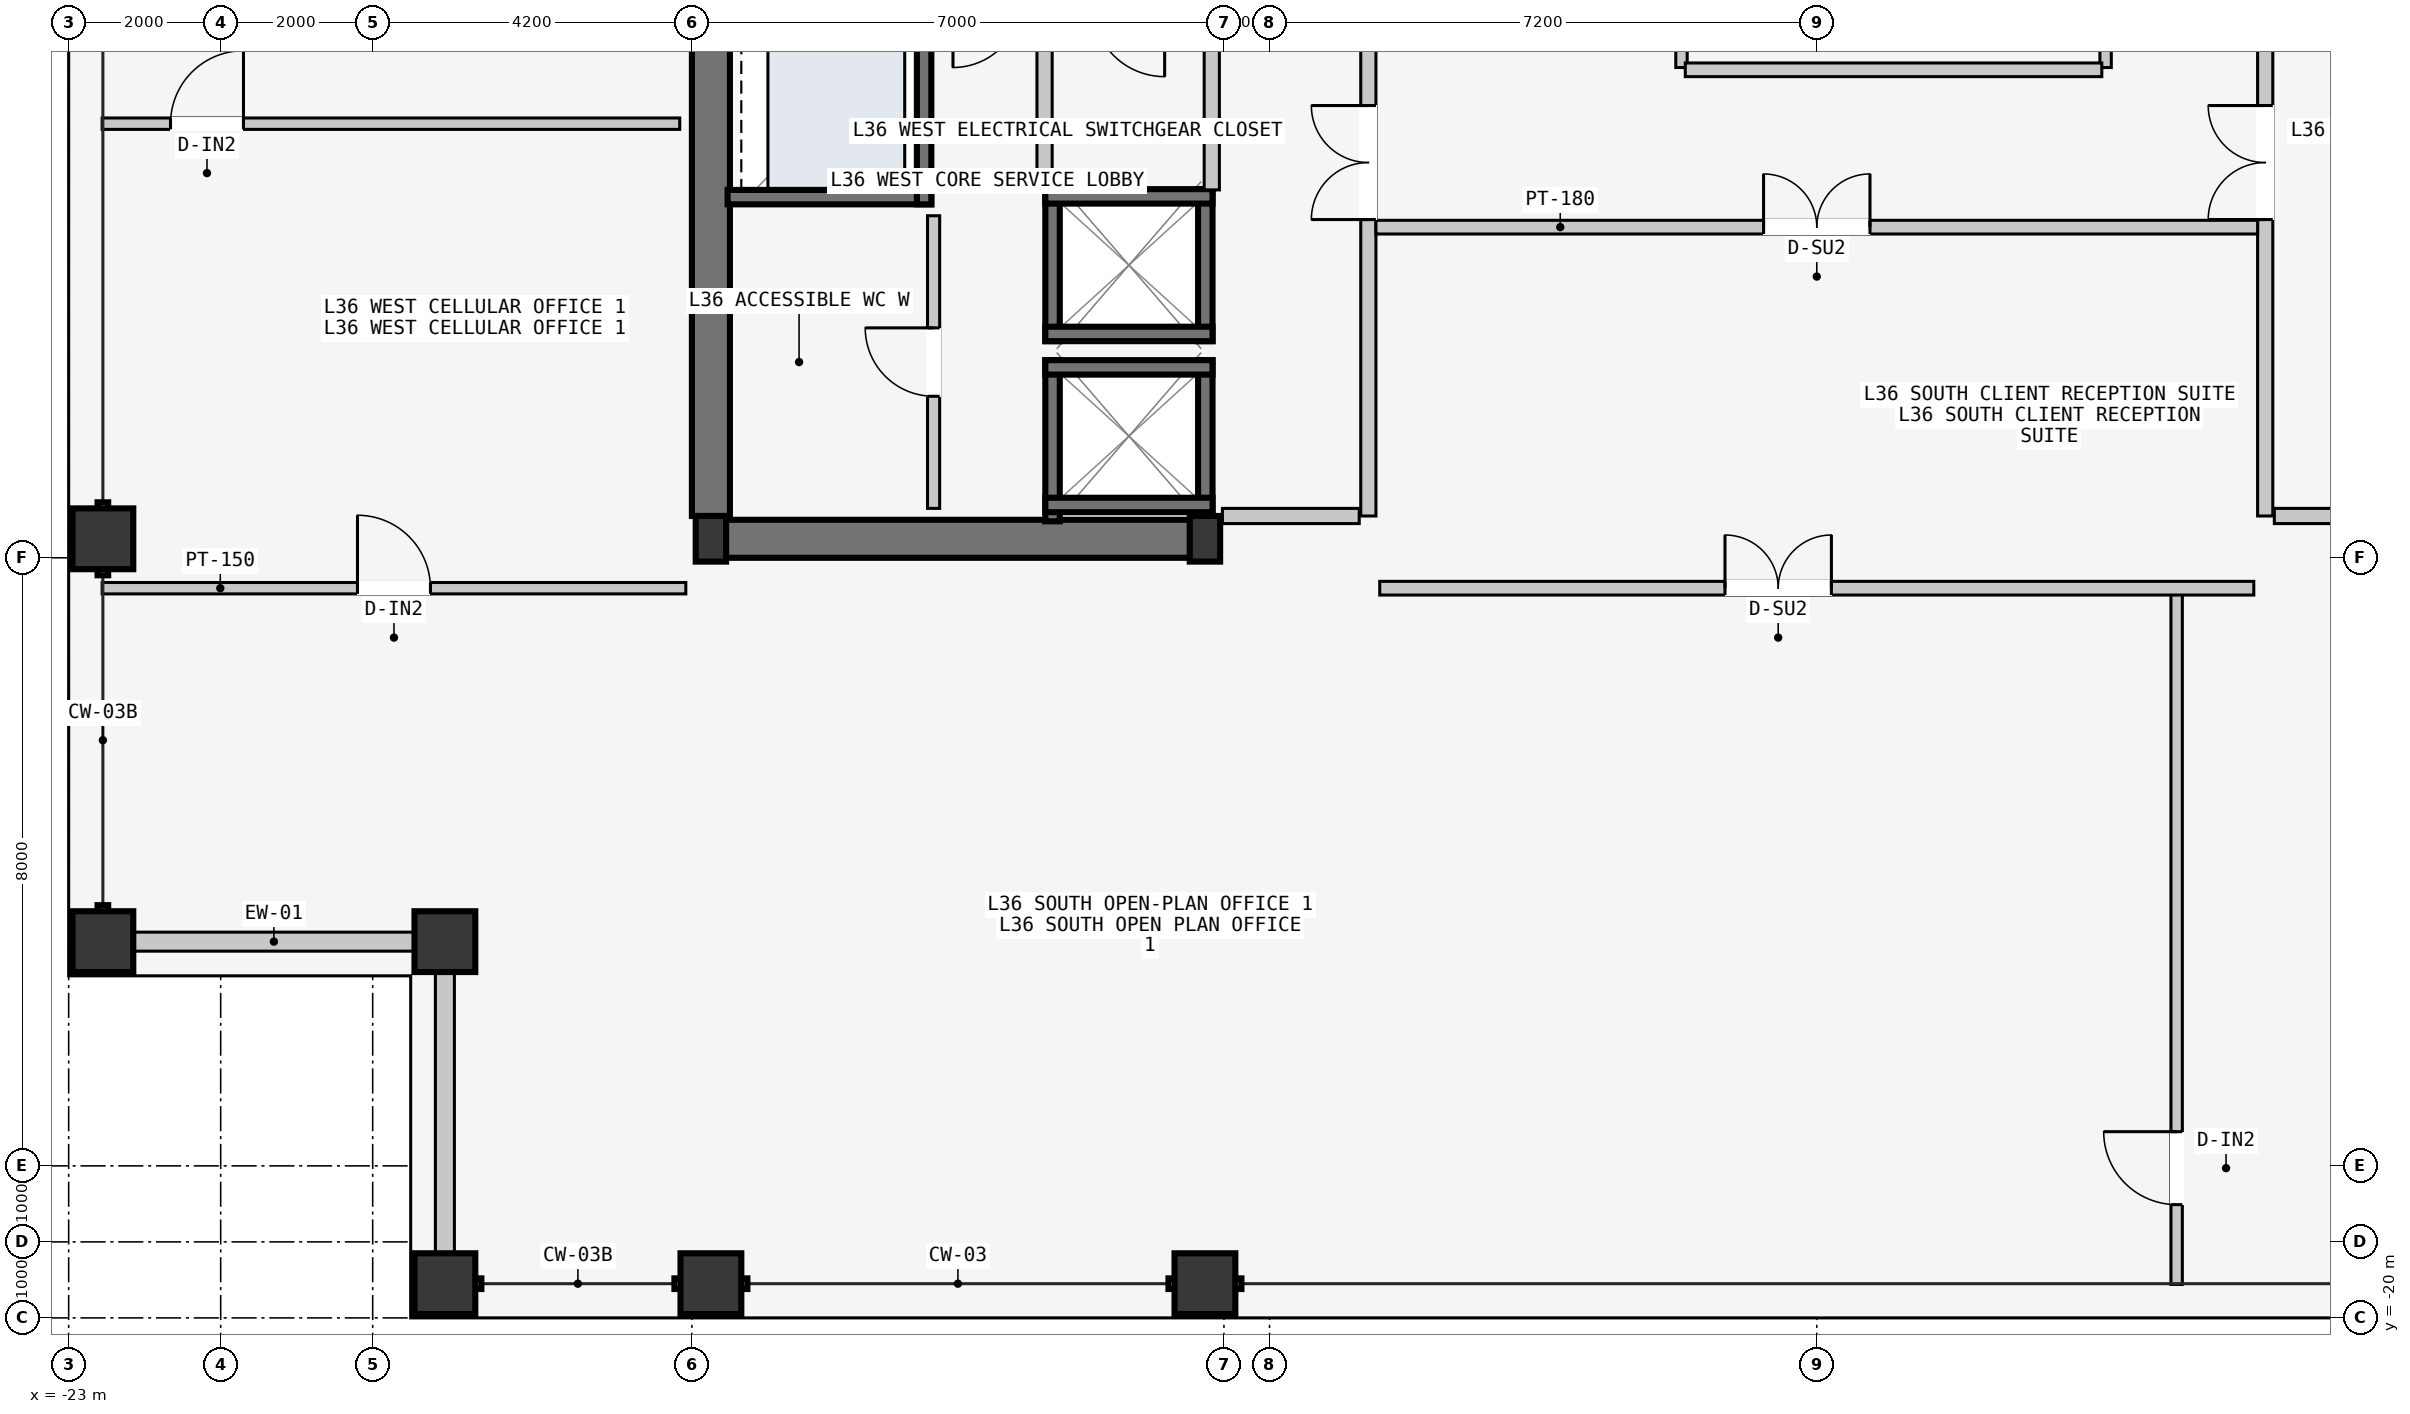
"""IFC4 building model, lengths in metres.
Left out: names, types, materials, properties, quantities, classifications, styles, units other than length and angle.
Written with IfcOpenShell. Run it as: python <this file> out.ifc"""

import sys

from ifc_helpers import new_model, si_unit, direction, frame, frame_2d, origin, origin_2d, place, context, subcontext, project, spatial, rectangle, hollow_rectangle, i_section, extrude, element, fill, save


model = new_model("IFC4")
c1 = context("Model", 3, precision=1e-05, world=origin(), true_north=direction((0.0, 1.0)))
c2 = subcontext(c1, "Body", "Model", "MODEL_VIEW")
j1 = project(units=[si_unit("LENGTHUNIT", "METRE"), si_unit("PLANEANGLEUNIT", "RADIAN")], contexts=[c1])
p1 = place(None, origin())
s1 = spatial("IfcSite", under=j1, at=p1, CompositionType="ELEMENT")
p2 = place(p1, origin())
s2 = spatial("IfcBuilding", under=s1, at=p2, CompositionType="ELEMENT")
p3 = place(p2, frame((0.0, 0.0, 138.6)))
s3 = spatial("IfcBuildingStorey", under=s2, at=p3, CompositionType="ELEMENT", Elevation=138.6)
p4 = place(p3, frame((-14.53, -9.75, -0.2), z_axis=(0.0, 0.0, 1.0), x_axis=(1.0, 0.0, 0.0)))
e1 = element("IfcWall", 1, at=p4, inside=s3, PredefinedType="SHEAR", context=c2, shape_type="SweptSolid", body=[
    extrude(rectangle(XDim=6.46, YDim=0.5, at=frame_2d((3.23, 0.0))), origin(), (0.0, 0.0, 1.0), 3.6),
])
p5 = place(p3, frame((-14.55, -9.45, -0.2), z_axis=(0.0, 0.0, 1.0), x_axis=(0.0, 1.0, 0.0)))
e2 = element("IfcWall", 2, at=p5, inside=s3, PredefinedType="SHEAR", context=c2, shape_type="SweptSolid", body=[
    extrude(rectangle(XDim=9.15, YDim=0.5, at=frame_2d((4.575, 0.0))), origin(), (0.0, 0.0, 1.0), 3.6),
])
for number, where, z_axis, x_axis in (
    (3, (-14.55, -9.75, 0.0), (0.0, 0.0, 1.0), (1.0, 0.0, 0.0)),
    (4, (-8.05, -9.75, 0.0), (0.0, 0.0, 1.0), (1.0, 0.0, 0.0)),
):
    element("IfcColumn", number, at=place(p3, frame(where, z_axis=z_axis, x_axis=x_axis)), inside=s3, PredefinedType="COLUMN", context=c2, shape_type="SweptSolid", body=[
        extrude(i_section(OverallWidth=0.4, OverallDepth=0.6, WebThickness=0.022, FlangeThickness=0.036, at=origin_2d()), origin(), (0.0, 0.0, 1.0), 3.6),
    ])
for number, where, z_axis, x_axis in (
    (5, (-18.05, -19.55, 0.0), (0.0, 0.0, 1.0), (1.0, 0.0, 0.0)),
    (6, (-14.55, -19.55, 0.0), (0.0, 0.0, 1.0), (1.0, 0.0, 0.0)),
    (7, (-8.05, -19.55, 0.0), (0.0, 0.0, 1.0), (1.0, 0.0, 0.0)),
    (8, (-22.55, -15.05, 0.0), (0.0, 0.0, 1.0), (0.0, 1.0, 0.0)),
    (9, (-22.55, -9.75, 0.0), (0.0, 0.0, 1.0), (0.0, 1.0, 0.0)),
    (10, (-18.05, -15.05, 0.0), (0.0, 0.0, 1.0), (1.0, 0.0, 0.0)),
):
    element("IfcColumn", number, at=place(p3, frame(where, z_axis=z_axis, x_axis=x_axis)), inside=s3, PredefinedType="COLUMN", context=c2, shape_type="SweptSolid", body=[
        extrude(hollow_rectangle(XDim=0.8, YDim=0.8, WallThickness=0.036, at=origin_2d()), origin(), (0.0, 0.0, 1.0), 3.6),
    ])
for number, where, z_axis, x_axis in (
    (11, (-22.14, -15.05, 0.0), (0.0, 0.0, 1.0), (1.0, 0.0, 0.0)),
    (12, (-18.05, -19.14, 0.0), (0.0, 0.0, 1.0), (0.0, 1.0, 0.0)),
):
    element("IfcWall", number, at=place(p3, frame(where, z_axis=z_axis, x_axis=x_axis)), inside=s3, PredefinedType="STANDARD", context=c2, shape_type="SweptSolid", body=[
        extrude(rectangle(XDim=3.68, YDim=0.25, at=frame_2d((1.84, 0.0))), origin(), (0.0, 0.0, 1.0), 2.75),
    ])
for number, where, z_axis, x_axis in (
    (13, (-8.045, -9.52, -0.2), (0.0, 0.0, 1.0), (0.0, 1.0, 0.0)),
    (14, (-10.055, -9.52, -0.2), (0.0, 0.0, 1.0), (0.0, 1.0, 0.0)),
):
    element("IfcWall", number, at=place(p3, frame(where, z_axis=z_axis, x_axis=x_axis)), inside=s3, PredefinedType="SOLIDWALL", context=c2, shape_type="SweptSolid", body=[
        extrude(rectangle(XDim=2.12, YDim=0.19, at=frame_2d((1.06, 0.0))), origin(), (0.0, 0.0, 1.0), 3.6),
    ])
for number, where, z_axis, x_axis in (
    (15, (-10.15, -7.495, -0.2), (0.0, 0.0, 1.0), (1.0, 0.0, 0.0)),
    (16, (-10.15, -9.305, -0.2), (0.0, 0.0, 1.0), (1.0, 0.0, 0.0)),
):
    element("IfcWall", number, at=place(p3, frame(where, z_axis=z_axis, x_axis=x_axis)), inside=s3, PredefinedType="SOLIDWALL", context=c2, shape_type="SweptSolid", body=[
        extrude(rectangle(XDim=2.2, YDim=0.19, at=frame_2d((1.1, 0.0))), origin(), (0.0, 0.0, 1.0), 3.6),
    ])
for number, where, z_axis, x_axis in (
    (17, (-8.045, -7.15, -0.2), (0.0, 0.0, 1.0), (0.0, 1.0, 0.0)),
    (18, (-10.055, -7.15, -0.2), (0.0, 0.0, 1.0), (0.0, 1.0, 0.0)),
):
    element("IfcWall", number, at=place(p3, frame(where, z_axis=z_axis, x_axis=x_axis)), inside=s3, PredefinedType="SOLIDWALL", context=c2, shape_type="SweptSolid", body=[
        extrude(rectangle(XDim=2.0, YDim=0.19, at=frame_2d((1.0, 0.0))), origin(), (0.0, 0.0, 1.0), 3.6),
    ])
for number, where, z_axis, x_axis in (
    (19, (-10.15, -5.245, -0.2), (0.0, 0.0, 1.0), (1.0, 0.0, 0.0)),
    (20, (-10.15, -7.055, -0.2), (0.0, 0.0, 1.0), (1.0, 0.0, 0.0)),
):
    element("IfcWall", number, at=place(p3, frame(where, z_axis=z_axis, x_axis=x_axis)), inside=s3, PredefinedType="SOLIDWALL", context=c2, shape_type="SweptSolid", body=[
        extrude(rectangle(XDim=2.2, YDim=0.19, at=frame_2d((1.1, 0.0))), origin(), (0.0, 0.0, 1.0), 3.6),
    ])
p6 = place(p3, frame((-14.33, -5.255, -0.2), z_axis=(0.0, 0.0, 1.0), x_axis=(1.0, 0.0, 0.0)))
e21 = element("IfcWall", 21, at=p6, inside=s3, PredefinedType="SOLIDWALL", context=c2, shape_type="SweptSolid", body=[
    extrude(rectangle(XDim=2.68, YDim=0.19, at=frame_2d((1.34, 0.0))), origin(), (0.0, 0.0, 1.0), 3.6),
])
p7 = place(p3, frame((-11.745, -5.35, -0.2), z_axis=(0.0, 0.0, 1.0), x_axis=(0.0, 1.0, 0.0)))
e22 = element("IfcWall", 22, at=p7, inside=s3, PredefinedType="SOLIDWALL", context=c2, shape_type="SweptSolid", body=[
    extrude(rectangle(XDim=2.6, YDim=0.19, at=frame_2d((1.3, 0.0))), origin(), (0.0, 0.0, 1.0), 3.6),
])
p8 = place(p3, frame((-5.9, -9.45, 0.0), z_axis=(0.0, 0.0, 1.0), x_axis=(0.0, 1.0, 0.0)))
e23 = element("IfcWall", 23, at=p8, inside=s3, PredefinedType="PARTITIONING", context=c2, shape_type="SweptSolid", body=[
    extrude(rectangle(XDim=10.5, YDim=0.2, at=frame_2d((5.25, 0.0))), origin(), (0.0, 0.0, 1.0), 3.4),
])
p9 = place(p8, frame((3.9, 0.0, 0.0)))
e24 = element("IfcOpeningElement", 24, at=p9, cuts=e23, PredefinedType="OPENING", context=c2, shape_type="SweptSolid", body=[
    extrude(rectangle(XDim=1.5, YDim=2.2, at=frame_2d((0.75, 1.1))), frame((0.0, 0.11, 0.0), z_axis=(0.0, -1.0, 0.0), x_axis=(1.0, 0.0, 0.0)), (0.0, 0.0, 1.0), 0.22),
])
p10 = place(p3, frame((-6.02, -9.45, 0.0), z_axis=(0.0, 0.0, 1.0), x_axis=(-1.0, 0.0, 0.0)))
e25 = element("IfcWall", 25, at=p10, inside=s3, PredefinedType="PARTITIONING", context=c2, shape_type="SweptSolid", body=[
    extrude(rectangle(XDim=1.8, YDim=0.2, at=frame_2d((0.9, 0.0))), origin(), (0.0, 0.0, 1.0), 3.4),
])
for number, where, z_axis, x_axis in (
    (26, (-7.96, -5.16, 0.0), (0.0, 0.0, 1.0), (0.0, 1.0, 0.0)),
    (27, (-10.16, -5.16, 0.0), (0.0, 0.0, 1.0), (0.0, 1.0, 0.0)),
):
    element("IfcWall", number, at=place(p3, frame(where, z_axis=z_axis, x_axis=x_axis)), inside=s3, PredefinedType="PARTITIONING", context=c2, shape_type="SweptSolid", body=[
        extrude(rectangle(XDim=2.44, YDim=0.2, at=frame_2d((1.22, 0.0))), origin(), (0.0, 0.0, 1.0), 3.4),
    ])
p11 = place(p3, frame((-11.62, -9.35, 0.0), z_axis=(0.0, 0.0, 1.0), x_axis=(0.0, 1.0, 0.0)))
e28 = element("IfcWall", 28, at=p11, inside=s3, PredefinedType="PARTITIONING", context=c2, shape_type="SweptSolid", body=[
    extrude(rectangle(XDim=3.85, YDim=0.16, at=frame_2d((1.925, 0.0))), origin(), (0.0, 0.0, 1.0), 3.4),
])
p12 = place(p11, frame((1.475, 0.0, 0.0)))
e29 = element("IfcOpeningElement", 29, at=p12, cuts=e28, PredefinedType="OPENING", context=c2, shape_type="SweptSolid", body=[
    extrude(rectangle(XDim=0.9, YDim=2.15, at=frame_2d((0.45, 1.075))), frame((0.0, 0.09, 0.0), z_axis=(0.0, -1.0, 0.0), x_axis=(1.0, 0.0, 0.0)), (0.0, 0.0, 1.0), 0.18),
])
p13 = place(p3, frame((5.9, -9.45, 0.0), z_axis=(0.0, 0.0, 1.0), x_axis=(0.0, 1.0, 0.0)))
e30 = element("IfcWall", 30, at=p13, inside=s3, PredefinedType="PARTITIONING", context=c2, shape_type="SweptSolid", body=[
    extrude(rectangle(XDim=18.9, YDim=0.2, at=frame_2d((9.45, 0.0))), origin(), (0.0, 0.0, 1.0), 3.4),
])
p14 = place(p13, frame((3.9, 0.0, 0.0)))
e31 = element("IfcOpeningElement", 31, at=p14, cuts=e30, PredefinedType="OPENING", context=c2, shape_type="SweptSolid", body=[
    extrude(rectangle(XDim=1.5, YDim=2.2, at=frame_2d((0.75, 1.1))), frame((0.0, 0.11, 0.0), z_axis=(0.0, -1.0, 0.0), x_axis=(1.0, 0.0, 0.0)), (0.0, 0.0, 1.0), 0.22),
])
p15 = place(p3, frame((6.02, -9.45, 0.0), z_axis=(0.0, 0.0, 1.0), x_axis=(1.0, 0.0, 0.0)))
e32 = element("IfcWall", 32, at=p15, inside=s3, PredefinedType="PARTITIONING", context=c2, shape_type="SweptSolid", body=[
    extrude(rectangle(XDim=1.8, YDim=0.2, at=frame_2d((0.9, 0.0))), origin(), (0.0, 0.0, 1.0), 3.4),
])
for number, where, z_axis, x_axis in (
    (33, (-1.78, -3.55, 0.0), (0.0, 0.0, 1.0), (0.0, 1.0, 0.0)),
    (34, (3.8, -3.55, 0.0), (0.0, 0.0, 1.0), (0.0, 1.0, 0.0)),
):
    element("IfcWall", number, at=place(p3, frame(where, z_axis=z_axis, x_axis=x_axis)), inside=s3, PredefinedType="PARTITIONING", context=c2, shape_type="SweptSolid", body=[
        extrude(rectangle(XDim=14.77, YDim=0.15, at=frame_2d((7.385, 0.0))), origin(), (0.0, 0.0, 1.0), 3.4),
    ])
p16 = place(p3, frame((-1.73, -3.58, 0.0), z_axis=(0.0, 0.0, 1.0), x_axis=(1.0, 0.0, 0.0)))
e35 = element("IfcWall", 35, at=p16, inside=s3, PredefinedType="PARTITIONING", context=c2, shape_type="SweptSolid", body=[
    extrude(rectangle(XDim=5.48, YDim=0.18, at=frame_2d((2.74, 0.0))), origin(), (0.0, 0.0, 1.0), 3.4),
])
p17 = place(p3, frame((-5.8, -5.65, 0.0), z_axis=(0.0, 0.0, 1.0), x_axis=(1.0, 0.0, 0.0)))
e36 = element("IfcWall", 36, at=p17, inside=s3, PredefinedType="PARTITIONING", context=c2, shape_type="SweptSolid", body=[
    extrude(rectangle(XDim=11.6, YDim=0.18, at=frame_2d((5.8, 0.0))), origin(), (0.0, 0.0, 1.0), 3.4),
])
p18 = place(p17, frame((5.1, 0.0, 0.0)))
e37 = element("IfcOpeningElement", 37, at=p18, cuts=e36, PredefinedType="OPENING", context=c2, shape_type="SweptSolid", body=[
    extrude(rectangle(XDim=1.4, YDim=2.2, at=frame_2d((0.7, 1.1))), frame((0.0, 0.1, 0.0), z_axis=(0.0, -1.0, 0.0), x_axis=(1.0, 0.0, 0.0)), (0.0, 0.0, 1.0), 0.2),
])
p19 = place(p3, frame((4.735, -19.56, 0.0), z_axis=(0.0, 0.0, 1.0), x_axis=(0.0, 1.0, 0.0)))
e38 = element("IfcWall", 38, at=p19, inside=s3, PredefinedType="PARTITIONING", context=c2, shape_type="SweptSolid", body=[
    extrude(rectangle(XDim=9.1, YDim=0.15, at=frame_2d((4.55, 0.0))), origin(), (0.0, 0.0, 1.0), 3.4),
])
p20 = place(p19, frame((1.05, 0.0, 0.0)))
e39 = element("IfcOpeningElement", 39, at=p20, cuts=e38, PredefinedType="OPENING", context=c2, shape_type="SweptSolid", body=[
    extrude(rectangle(XDim=0.96, YDim=2.18, at=frame_2d((0.48, 1.09))), frame((0.0, 0.085, 0.0), z_axis=(0.0, -1.0, 0.0), x_axis=(1.0, 0.0, 0.0)), (0.0, 0.0, 1.0), 0.17),
])
p21 = place(p3, frame((-5.75, -10.4, 0.0), z_axis=(0.0, 0.0, 1.0), x_axis=(1.0, 0.0, 0.0)))
e40 = element("IfcWall", 40, at=p21, inside=s3, PredefinedType="PARTITIONING", context=c2, shape_type="SweptSolid", body=[
    extrude(rectangle(XDim=11.5, YDim=0.18, at=frame_2d((5.75, 0.0))), origin(), (0.0, 0.0, 1.0), 3.4),
])
p22 = place(p21, frame((4.542, 0.0, 0.0)))
e41 = element("IfcOpeningElement", 41, at=p22, cuts=e40, PredefinedType="OPENING", context=c2, shape_type="SweptSolid", body=[
    extrude(rectangle(XDim=1.4, YDim=2.2, at=frame_2d((0.7, 1.1))), frame((0.0, 0.1, 0.0), z_axis=(0.0, -1.0, 0.0), x_axis=(1.0, 0.0, 0.0)), (0.0, 0.0, 1.0), 0.2),
])
p23 = place(p3, frame((-22.56, -10.4, 0.0), z_axis=(0.0, 0.0, 1.0), x_axis=(1.0, 0.0, 0.0)))
e42 = element("IfcWall", 42, at=p23, inside=s3, PredefinedType="PARTITIONING", context=c2, shape_type="SweptSolid", body=[
    extrude(rectangle(XDim=7.68, YDim=0.15, at=frame_2d((3.84, 0.0))), origin(), (0.0, 0.0, 1.0), 3.4),
])
p24 = place(p23, frame((3.36, 0.0, 0.0)))
e43 = element("IfcOpeningElement", 43, at=p24, cuts=e42, PredefinedType="OPENING", context=c2, shape_type="SweptSolid", body=[
    extrude(rectangle(XDim=0.96, YDim=2.18, at=frame_2d((0.48, 1.09))), frame((0.0, 0.085, 0.0), z_axis=(0.0, -1.0, 0.0), x_axis=(1.0, 0.0, 0.0)), (0.0, 0.0, 1.0), 0.17),
])
p25 = place(p3, frame((-22.56, -4.289, 0.0), z_axis=(0.0, 0.0, 1.0), x_axis=(1.0, 0.0, 0.0)))
e44 = element("IfcWall", 44, at=p25, inside=s3, PredefinedType="PARTITIONING", context=c2, shape_type="SweptSolid", body=[
    extrude(rectangle(XDim=7.6, YDim=0.15, at=frame_2d((3.8, 0.0))), origin(), (0.0, 0.0, 1.0), 3.4),
])
p26 = place(p25, frame((0.9, 0.0, 0.0)))
e45 = element("IfcOpeningElement", 45, at=p26, cuts=e44, PredefinedType="OPENING", context=c2, shape_type="SweptSolid", body=[
    extrude(rectangle(XDim=0.96, YDim=2.18, at=frame_2d((0.48, 1.09))), frame((0.0, 0.085, 0.0), z_axis=(0.0, -1.0, 0.0), x_axis=(1.0, 0.0, 0.0)), (0.0, 0.0, 1.0), 0.17),
])
p27 = place(p9, origin())
e46 = element("IfcDoor", 46, at=p27, inside=s3, OperationType="DOUBLE_DOOR_SINGLE_SWING", PredefinedType="DOOR", context=c2, shape_type="SweptSolid", body=[
    extrude(rectangle(XDim=1.5, YDim=2.2, at=frame_2d((0.75, 1.1))), frame((0.0, 0.025, 0.0), z_axis=(0.0, -1.0, 0.0), x_axis=(1.0, 0.0, 0.0)), (0.0, 0.0, 1.0), 0.05),
])
fill(e24, e46)
p28 = place(p12, origin())
e47 = element("IfcDoor", 47, at=p28, inside=s3, OperationType="SINGLE_SWING_RIGHT", PredefinedType="DOOR", context=c2, shape_type="SweptSolid", body=[
    extrude(rectangle(XDim=0.9, YDim=2.15, at=frame_2d((0.45, 1.075))), frame((0.0, 0.025, 0.0), z_axis=(0.0, -1.0, 0.0), x_axis=(1.0, 0.0, 0.0)), (0.0, 0.0, 1.0), 0.05),
])
fill(e29, e47)
p29 = place(p14, origin())
e48 = element("IfcDoor", 48, at=p29, inside=s3, OperationType="DOUBLE_DOOR_SINGLE_SWING", PredefinedType="DOOR", context=c2, shape_type="SweptSolid", body=[
    extrude(rectangle(XDim=1.5, YDim=2.2, at=frame_2d((0.75, 1.1))), frame((0.0, 0.025, 0.0), z_axis=(0.0, -1.0, 0.0), x_axis=(1.0, 0.0, 0.0)), (0.0, 0.0, 1.0), 0.05),
])
fill(e31, e48)
p30 = place(p18, origin())
e49 = element("IfcDoor", 49, at=p30, inside=s3, OperationType="DOUBLE_DOOR_SINGLE_SWING", PredefinedType="DOOR", context=c2, shape_type="SweptSolid", body=[
    extrude(rectangle(XDim=1.4, YDim=2.2, at=frame_2d((0.7, 1.1))), frame((0.0, 0.025, 0.0), z_axis=(0.0, -1.0, 0.0), x_axis=(1.0, 0.0, 0.0)), (0.0, 0.0, 1.0), 0.05),
])
fill(e37, e49)
p31 = place(p20, origin())
e50 = element("IfcDoor", 50, at=p31, inside=s3, OperationType="SINGLE_SWING_RIGHT", PredefinedType="DOOR", context=c2, shape_type="SweptSolid", body=[
    extrude(rectangle(XDim=0.96, YDim=2.18, at=frame_2d((0.48, 1.09))), frame((0.0, 0.025, 0.0), z_axis=(0.0, -1.0, 0.0), x_axis=(1.0, 0.0, 0.0)), (0.0, 0.0, 1.0), 0.05),
])
fill(e39, e50)
p32 = place(p22, origin())
e51 = element("IfcDoor", 51, at=p32, inside=s3, OperationType="DOUBLE_DOOR_SINGLE_SWING", PredefinedType="DOOR", context=c2, shape_type="SweptSolid", body=[
    extrude(rectangle(XDim=1.4, YDim=2.2, at=frame_2d((0.7, 1.1))), frame((0.0, 0.025, 0.0), z_axis=(0.0, -1.0, 0.0), x_axis=(1.0, 0.0, 0.0)), (0.0, 0.0, 1.0), 0.05),
])
fill(e41, e51)
p33 = place(p24, origin())
e52 = element("IfcDoor", 52, at=p33, inside=s3, OperationType="SINGLE_SWING_LEFT", PredefinedType="DOOR", context=c2, shape_type="SweptSolid", body=[
    extrude(rectangle(XDim=0.96, YDim=2.18, at=frame_2d((0.48, 1.09))), frame((0.0, 0.025, 0.0), z_axis=(0.0, -1.0, 0.0), x_axis=(1.0, 0.0, 0.0)), (0.0, 0.0, 1.0), 0.05),
])
fill(e43, e52)
p34 = place(p26, origin())
e53 = element("IfcDoor", 53, at=p34, inside=s3, OperationType="SINGLE_SWING_RIGHT", PredefinedType="DOOR", context=c2, shape_type="SweptSolid", body=[
    extrude(rectangle(XDim=0.96, YDim=2.18, at=frame_2d((0.48, 1.09))), frame((0.0, 0.025, 0.0), z_axis=(0.0, -1.0, 0.0), x_axis=(1.0, 0.0, 0.0)), (0.0, 0.0, 1.0), 0.05),
])
fill(e45, e53)
save(model, sys.argv[1])
